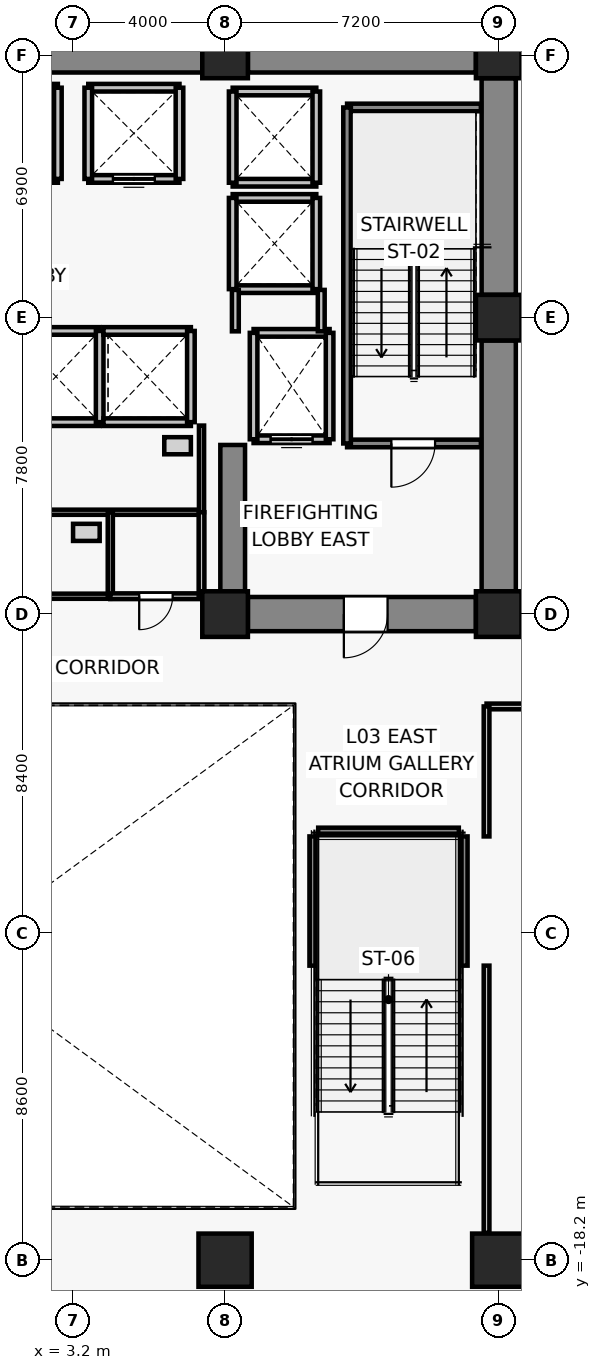
"""IFC4 building model, lengths in metres.
Left out: names, types, materials, properties, quantities, classifications, styles, units other than length and angle.
Written with IfcOpenShell. Run it as: python <this file> out.ifc"""

import sys

from ifc_helpers import new_model, si_unit, direction, frame, frame_2d, origin, origin_2d, place, context, subcontext, project, spatial, rectangle, extrude, source, transform, mapped, element, fill, save


model = new_model("IFC4")
c1 = context("Model", 3, precision=1e-05, world=origin(), true_north=direction((0.0, 1.0)))
c2 = subcontext(c1, "Body", "Model", "MODEL_VIEW")
j1 = project(units=[si_unit("LENGTHUNIT", "METRE"), si_unit("PLANEANGLEUNIT", "RADIAN")], contexts=[c1])
p1 = place(None, origin())
s1 = spatial("IfcSite", under=j1, at=p1, CompositionType="ELEMENT")
p2 = place(p1, origin())
s2 = spatial("IfcBuilding", under=s1, at=p2, CompositionType="ELEMENT")
p3 = place(p2, frame((0.0, 0.0, 13.8)))
s3 = spatial("IfcBuildingStorey", under=s2, at=p3, CompositionType="ELEMENT", Elevation=13.8)
for number, where, z_axis, x_axis in (
    (1, (7.2, -1.2, 0.0), (0.0, 0.0, 1.0), (1.0, 0.0, 0.0)),
    (2, (14.4, -1.2, 0.0), (0.0, 0.0, 1.0), (1.0, 0.0, 0.0)),
    (3, (14.4, 6.6, 0.0), (0.0, 0.0, 1.0), (1.0, 0.0, 0.0)),
    (4, (7.2, 13.5, 0.0), (0.0, 0.0, 1.0), (1.0, 0.0, 0.0)),
    (5, (14.4, 13.5, 0.0), (0.0, 0.0, 1.0), (1.0, 0.0, 0.0)),
):
    element("IfcColumn", number, at=place(p3, frame(where, z_axis=z_axis, x_axis=x_axis)), inside=s3, PredefinedType="COLUMN", context=c2, shape_type="SweptSolid", body=[
        extrude(rectangle(XDim=1.2, YDim=1.2, at=origin_2d()), origin(), (0.0, 0.0, 1.0), 4.4),
    ])
for number, where, z_axis, x_axis in (
    (6, (7.2, -18.2, 0.0), (0.0, 0.0, 1.0), (1.0, 0.0, 0.0)),
    (7, (14.4, -18.2, 0.0), (0.0, 0.0, 1.0), (1.0, 0.0, 0.0)),
):
    element("IfcColumn", number, at=place(p3, frame(where, z_axis=z_axis, x_axis=x_axis)), inside=s3, PredefinedType="COLUMN", context=c2, shape_type="SweptSolid", body=[
        extrude(rectangle(XDim=1.4, YDim=1.4, at=origin_2d()), origin(), (0.0, 0.0, 1.0), 4.4),
    ])
p4 = place(p3, frame((-6.6, 13.5, 0.0), z_axis=(0.0, 0.0, 1.0), x_axis=(1.0, 0.0, 0.0)))
e8 = element("IfcWall", 8, at=p4, inside=s3, PredefinedType="SHEAR", context=c2, shape_type="SweptSolid", body=[
    extrude(rectangle(XDim=13.2, YDim=0.9, at=frame_2d((6.6, 0.0))), origin(), (0.0, 0.0, 1.0), 4.1),
])
p5 = place(p3, frame((7.8, 13.5, 0.0), z_axis=(0.0, 0.0, 1.0), x_axis=(1.0, 0.0, 0.0)))
e9 = element("IfcWall", 9, at=p5, inside=s3, PredefinedType="SHEAR", context=c2, shape_type="SweptSolid", body=[
    extrude(rectangle(XDim=6.0, YDim=0.9, at=frame_2d((3.0, 0.0))), origin(), (0.0, 0.0, 1.0), 4.1),
])
p6 = place(p3, frame((14.4, -0.6, 0.0), z_axis=(0.0, 0.0, 1.0), x_axis=(0.0, 1.0, 0.0)))
e10 = element("IfcWall", 10, at=p6, inside=s3, PredefinedType="SHEAR", context=c2, shape_type="SweptSolid", body=[
    extrude(rectangle(XDim=6.6, YDim=0.9, at=frame_2d((3.3, 0.0))), origin(), (0.0, 0.0, 1.0), 4.1),
])
p7 = place(p3, frame((14.4, 7.2, 0.0), z_axis=(0.0, 0.0, 1.0), x_axis=(0.0, 1.0, 0.0)))
e11 = element("IfcWall", 11, at=p7, inside=s3, PredefinedType="SHEAR", context=c2, shape_type="SweptSolid", body=[
    extrude(rectangle(XDim=5.7, YDim=0.9, at=frame_2d((2.85, 0.0))), origin(), (0.0, 0.0, 1.0), 4.1),
])
p8 = place(p3, frame((13.8, -1.2, 0.0), z_axis=(0.0, 0.0, 1.0), x_axis=(-1.0, 0.0, 0.0)))
e12 = element("IfcWall", 12, at=p8, inside=s3, PredefinedType="SHEAR", context=c2, shape_type="SweptSolid", body=[
    extrude(rectangle(XDim=6.0, YDim=0.9, at=frame_2d((3.0, 0.0))), origin(), (0.0, 0.0, 1.0), 4.1),
])
p9 = place(p8, frame((2.325, 0.0, 0.0)))
e13 = element("IfcOpeningElement", 13, at=p9, cuts=e12, PredefinedType="OPENING", context=c2, shape_type="SweptSolid", body=[
    extrude(rectangle(XDim=1.15, YDim=2.15, at=frame_2d((0.575, 1.075))), frame((0.0, 0.46, 0.0), z_axis=(0.0, -1.0, 0.0), x_axis=(1.0, 0.0, 0.0)), (0.0, 0.0, 1.0), 0.92),
])
p10 = place(p3, frame((7.4, -0.75, 0.0), z_axis=(0.0, 0.0, 1.0), x_axis=(0.0, 1.0, 0.0)))
e14 = element("IfcWall", 14, at=p10, inside=s3, PredefinedType="SHEAR", context=c2, shape_type="SweptSolid", body=[
    extrude(rectangle(XDim=4.0, YDim=0.65, at=frame_2d((2.0, 0.0))), origin(), (0.0, 0.0, 1.0), 4.1),
])
for number, where, z_axis, x_axis in (
    (15, (9.52, -10.45, 0.0), (0.0, 0.0, 1.0), (0.0, 1.0, 0.0)),
    (16, (13.48, -7.05, 0.0), (0.0, 0.0, 1.0), (0.0, -1.0, 0.0)),
):
    element("IfcWall", number, at=place(p3, frame(where, z_axis=z_axis, x_axis=x_axis)), inside=s3, PredefinedType="SOLIDWALL", context=c2, shape_type="SweptSolid", body=[
        extrude(rectangle(XDim=3.4, YDim=0.2, at=frame_2d((1.7, 0.0))), origin(), (0.0, 0.0, 1.0), 4.1),
    ])
p11 = place(p3, frame((9.65, -6.92, 0.0), z_axis=(0.0, 0.0, 1.0), x_axis=(1.0, 0.0, 0.0)))
e17 = element("IfcWall", 17, at=p11, inside=s3, PredefinedType="SOLIDWALL", context=c2, shape_type="SweptSolid", body=[
    extrude(rectangle(XDim=3.7, YDim=0.2, at=frame_2d((1.85, 0.0))), origin(), (0.0, 0.0, 1.0), 4.1),
])
p12 = place(p3, frame((9.95, 3.4, 0.0), z_axis=(0.0, 0.0, 1.0), x_axis=(-1.0, 0.0, 0.0)))
e18 = element("IfcWall", 18, at=p12, inside=s3, PredefinedType="SOLIDWALL", context=c2, shape_type="SweptSolid", body=[
    extrude(rectangle(XDim=2.0, YDim=0.2, at=frame_2d((1.0, 0.0))), origin(), (0.0, 0.0, 1.0), 4.1),
])
p13 = place(p12, frame((0.45, 0.0, 0.0)))
e19 = element("IfcOpeningElement", 19, at=p13, cuts=e18, PredefinedType="OPENING", context=c2, shape_type="SweptSolid", body=[
    extrude(rectangle(XDim=1.1, YDim=2.2, at=frame_2d((0.55, 1.1))), frame((0.0, 0.11, 0.0), z_axis=(0.0, -1.0, 0.0), x_axis=(1.0, 0.0, 0.0)), (0.0, 0.0, 1.0), 0.22),
])
p14 = place(p3, frame((7.95, 6.2, 0.0), z_axis=(0.0, 0.0, 1.0), x_axis=(1.0, 0.0, 0.0)))
e20 = element("IfcWall", 20, at=p14, inside=s3, PredefinedType="SOLIDWALL", context=c2, shape_type="SweptSolid", body=[
    extrude(rectangle(XDim=2.0, YDim=0.2, at=frame_2d((1.0, 0.0))), origin(), (0.0, 0.0, 1.0), 4.1),
])
for number, where, z_axis, x_axis in (
    (21, (7.95, 3.4, 0.0), (0.0, 0.0, 1.0), (0.0, 1.0, 0.0)),
    (22, (9.95, 6.2, 0.0), (0.0, 0.0, 1.0), (0.0, -1.0, 0.0)),
):
    element("IfcWall", number, at=place(p3, frame(where, z_axis=z_axis, x_axis=x_axis)), inside=s3, PredefinedType="SOLIDWALL", context=c2, shape_type="SweptSolid", body=[
        extrude(rectangle(XDim=2.8, YDim=0.2, at=frame_2d((1.4, 0.0))), origin(), (0.0, 0.0, 1.0), 4.1),
    ])
p15 = place(p3, frame((2.8, 10.25, 0.0), z_axis=(0.0, 0.0, 1.0), x_axis=(-1.0, 0.0, 0.0)))
e23 = element("IfcWall", 23, at=p15, inside=s3, PredefinedType="SOLIDWALL", context=c2, shape_type="SweptSolid", body=[
    extrude(rectangle(XDim=2.4, YDim=0.2, at=frame_2d((1.2, 0.0))), origin(), (0.0, 0.0, 1.0), 4.1),
])
p16 = place(p15, frame((0.65, 0.0, 0.0)))
e24 = element("IfcOpeningElement", 24, at=p16, cuts=e23, PredefinedType="OPENING", context=c2, shape_type="SweptSolid", body=[
    extrude(rectangle(XDim=1.1, YDim=2.2, at=frame_2d((0.55, 1.1))), frame((0.0, 0.11, 0.0), z_axis=(0.0, -1.0, 0.0), x_axis=(1.0, 0.0, 0.0)), (0.0, 0.0, 1.0), 0.22),
])
p17 = place(p3, frame((0.4, 12.65, 0.0), z_axis=(0.0, 0.0, 1.0), x_axis=(1.0, 0.0, 0.0)))
e25 = element("IfcWall", 25, at=p17, inside=s3, PredefinedType="SOLIDWALL", context=c2, shape_type="SweptSolid", body=[
    extrude(rectangle(XDim=2.4, YDim=0.2, at=frame_2d((1.2, 0.0))), origin(), (0.0, 0.0, 1.0), 4.1),
])
p18 = place(p3, frame((2.8, 12.65, 0.0), z_axis=(0.0, 0.0, 1.0), x_axis=(0.0, -1.0, 0.0)))
e26 = element("IfcWall", 26, at=p18, inside=s3, PredefinedType="SOLIDWALL", context=c2, shape_type="SweptSolid", body=[
    extrude(rectangle(XDim=2.4, YDim=0.2, at=frame_2d((1.2, 0.0))), origin(), (0.0, 0.0, 1.0), 4.1),
])
p19 = place(p3, frame((6.0, 10.25, 0.0), z_axis=(0.0, 0.0, 1.0), x_axis=(-1.0, 0.0, 0.0)))
e27 = element("IfcWall", 27, at=p19, inside=s3, PredefinedType="SOLIDWALL", context=c2, shape_type="SweptSolid", body=[
    extrude(rectangle(XDim=2.4, YDim=0.2, at=frame_2d((1.2, 0.0))), origin(), (0.0, 0.0, 1.0), 4.1),
])
p20 = place(p19, frame((0.65, 0.0, 0.0)))
e28 = element("IfcOpeningElement", 28, at=p20, cuts=e27, PredefinedType="OPENING", context=c2, shape_type="SweptSolid", body=[
    extrude(rectangle(XDim=1.1, YDim=2.2, at=frame_2d((0.55, 1.1))), frame((0.0, 0.11, 0.0), z_axis=(0.0, -1.0, 0.0), x_axis=(1.0, 0.0, 0.0)), (0.0, 0.0, 1.0), 0.22),
])
for number, where, z_axis, x_axis in (
    (29, (3.6, 12.65, 0.0), (0.0, 0.0, 1.0), (1.0, 0.0, 0.0)),
    (30, (3.6, 10.25, 0.0), (0.0, 0.0, 1.0), (0.0, 1.0, 0.0)),
    (31, (6.0, 12.65, 0.0), (0.0, 0.0, 1.0), (0.0, -1.0, 0.0)),
):
    element("IfcWall", number, at=place(p3, frame(where, z_axis=z_axis, x_axis=x_axis)), inside=s3, PredefinedType="SOLIDWALL", context=c2, shape_type="SweptSolid", body=[
        extrude(rectangle(XDim=2.4, YDim=0.2, at=frame_2d((1.2, 0.0))), origin(), (0.0, 0.0, 1.0), 4.1),
    ])
for number, where, z_axis, x_axis in (
    (32, (3.9, 3.85, 0.0), (0.0, 0.0, 1.0), (-1.0, 0.0, 0.0)),
    (33, (1.6, 6.25, 0.0), (0.0, 0.0, 1.0), (1.0, 0.0, 0.0)),
):
    element("IfcWall", number, at=place(p3, frame(where, z_axis=z_axis, x_axis=x_axis)), inside=s3, PredefinedType="SOLIDWALL", context=c2, shape_type="SweptSolid", body=[
        extrude(rectangle(XDim=2.3, YDim=0.2, at=frame_2d((1.15, 0.0))), origin(), (0.0, 0.0, 1.0), 4.1),
    ])
p21 = place(p3, frame((3.9, 6.25, 0.0), z_axis=(0.0, 0.0, 1.0), x_axis=(0.0, -1.0, 0.0)))
e34 = element("IfcWall", 34, at=p21, inside=s3, PredefinedType="SOLIDWALL", context=c2, shape_type="SweptSolid", body=[
    extrude(rectangle(XDim=2.4, YDim=0.2, at=frame_2d((1.2, 0.0))), origin(), (0.0, 0.0, 1.0), 4.1),
])
for number, where, z_axis, x_axis in (
    (35, (6.3, 3.85, 0.0), (0.0, 0.0, 1.0), (-1.0, 0.0, 0.0)),
    (36, (4.0, 6.25, 0.0), (0.0, 0.0, 1.0), (1.0, 0.0, 0.0)),
):
    element("IfcWall", number, at=place(p3, frame(where, z_axis=z_axis, x_axis=x_axis)), inside=s3, PredefinedType="SOLIDWALL", context=c2, shape_type="SweptSolid", body=[
        extrude(rectangle(XDim=2.3, YDim=0.2, at=frame_2d((1.15, 0.0))), origin(), (0.0, 0.0, 1.0), 4.1),
    ])
p22 = place(p3, frame((6.3, 6.25, 0.0), z_axis=(0.0, 0.0, 1.0), x_axis=(0.0, -1.0, 0.0)))
e37 = element("IfcWall", 37, at=p22, inside=s3, PredefinedType="SOLIDWALL", context=c2, shape_type="SweptSolid", body=[
    extrude(rectangle(XDim=2.4, YDim=0.2, at=frame_2d((1.2, 0.0))), origin(), (0.0, 0.0, 1.0), 4.1),
])
for number, where, z_axis, x_axis in (
    (38, (9.6, 7.35, 0.0), (0.0, 0.0, 1.0), (-1.0, 0.0, 0.0)),
    (39, (7.4, 9.75, 0.0), (0.0, 0.0, 1.0), (1.0, 0.0, 0.0)),
):
    element("IfcWall", number, at=place(p3, frame(where, z_axis=z_axis, x_axis=x_axis)), inside=s3, PredefinedType="SOLIDWALL", context=c2, shape_type="SweptSolid", body=[
        extrude(rectangle(XDim=2.2, YDim=0.2, at=frame_2d((1.1, 0.0))), origin(), (0.0, 0.0, 1.0), 3.19),
    ])
p23 = place(p3, frame((7.4, 7.35, 0.0), z_axis=(0.0, 0.0, 1.0), x_axis=(0.0, 1.0, 0.0)))
e40 = element("IfcWall", 40, at=p23, inside=s3, PredefinedType="SOLIDWALL", context=c2, shape_type="SweptSolid", body=[
    extrude(rectangle(XDim=2.4, YDim=0.2, at=frame_2d((1.2, 0.0))), origin(), (0.0, 0.0, 1.0), 3.19),
])
p24 = place(p3, frame((9.6, 9.75, 0.0), z_axis=(0.0, 0.0, 1.0), x_axis=(0.0, -1.0, 0.0)))
e41 = element("IfcWall", 41, at=p24, inside=s3, PredefinedType="SOLIDWALL", context=c2, shape_type="SweptSolid", body=[
    extrude(rectangle(XDim=2.4, YDim=0.2, at=frame_2d((1.2, 0.0))), origin(), (0.0, 0.0, 1.0), 4.1),
])
for number, where, z_axis, x_axis in (
    (42, (9.6, 10.15, 0.0), (0.0, 0.0, 1.0), (-1.0, 0.0, 0.0)),
    (43, (7.4, 12.55, 0.0), (0.0, 0.0, 1.0), (1.0, 0.0, 0.0)),
):
    element("IfcWall", number, at=place(p3, frame(where, z_axis=z_axis, x_axis=x_axis)), inside=s3, PredefinedType="SOLIDWALL", context=c2, shape_type="SweptSolid", body=[
        extrude(rectangle(XDim=2.2, YDim=0.2, at=frame_2d((1.1, 0.0))), origin(), (0.0, 0.0, 1.0), 3.19),
    ])
p25 = place(p3, frame((7.4, 10.15, 0.0), z_axis=(0.0, 0.0, 1.0), x_axis=(0.0, 1.0, 0.0)))
e44 = element("IfcWall", 44, at=p25, inside=s3, PredefinedType="SOLIDWALL", context=c2, shape_type="SweptSolid", body=[
    extrude(rectangle(XDim=2.4, YDim=0.2, at=frame_2d((1.2, 0.0))), origin(), (0.0, 0.0, 1.0), 3.19),
])
p26 = place(p3, frame((9.6, 12.55, 0.0), z_axis=(0.0, 0.0, 1.0), x_axis=(0.0, -1.0, 0.0)))
e45 = element("IfcWall", 45, at=p26, inside=s3, PredefinedType="SOLIDWALL", context=c2, shape_type="SweptSolid", body=[
    extrude(rectangle(XDim=2.4, YDim=0.2, at=frame_2d((1.2, 0.0))), origin(), (0.0, 0.0, 1.0), 4.1),
])
p27 = place(p3, frame((13.93, 3.29, 0.0), z_axis=(0.0, 0.0, 1.0), x_axis=(-1.0, 0.0, 0.0)))
e46 = element("IfcWall", 46, at=p27, inside=s3, PredefinedType="SOLIDWALL", context=c2, shape_type="SweptSolid", body=[
    extrude(rectangle(XDim=3.52, YDim=0.2, at=frame_2d((1.76, 0.0))), origin(), (0.0, 0.0, 1.0), 4.1),
])
p28 = place(p27, frame((1.205, 0.0, 0.0)))
e47 = element("IfcOpeningElement", 47, at=p28, cuts=e46, PredefinedType="OPENING", context=c2, shape_type="SweptSolid", body=[
    extrude(rectangle(XDim=1.15, YDim=2.15, at=frame_2d((0.575, 1.075))), frame((0.0, 0.11, 0.0), z_axis=(0.0, -1.0, 0.0), x_axis=(1.0, 0.0, 0.0)), (0.0, 0.0, 1.0), 0.22),
])
p29 = place(p3, frame((10.41, 12.13, 0.0), z_axis=(0.0, 0.0, 1.0), x_axis=(1.0, 0.0, 0.0)))
e48 = element("IfcWall", 48, at=p29, inside=s3, PredefinedType="SOLIDWALL", context=c2, shape_type="SweptSolid", body=[
    extrude(rectangle(XDim=3.52, YDim=0.2, at=frame_2d((1.76, 0.0))), origin(), (0.0, 0.0, 1.0), 4.1),
])
p30 = place(p3, frame((10.41, 3.29, 0.0), z_axis=(0.0, 0.0, 1.0), x_axis=(0.0, 1.0, 0.0)))
e49 = element("IfcWall", 49, at=p30, inside=s3, PredefinedType="SOLIDWALL", context=c2, shape_type="SweptSolid", body=[
    extrude(rectangle(XDim=8.84, YDim=0.2, at=frame_2d((4.42, 0.0))), origin(), (0.0, 0.0, 1.0), 4.1),
])
p31 = place(p3, frame((7.47, 6.24, 0.0), z_axis=(0.0, 0.0, 1.0), x_axis=(0.0, 1.0, 0.0)))
e50 = element("IfcWall", 50, at=p31, inside=s3, PredefinedType="PARTITIONING", context=c2, shape_type="SweptSolid", body=[
    extrude(rectangle(XDim=1.09, YDim=0.18, at=frame_2d((0.545, 0.0))), origin(), (0.0, 0.0, 1.0), 3.19),
])
p32 = place(p3, frame((9.73, 7.33, 0.0), z_axis=(0.0, 0.0, 1.0), x_axis=(0.0, -1.0, 0.0)))
e51 = element("IfcWall", 51, at=p32, inside=s3, PredefinedType="PARTITIONING", context=c2, shape_type="SweptSolid", body=[
    extrude(rectangle(XDim=1.09, YDim=0.18, at=frame_2d((0.545, 0.0))), origin(), (0.0, 0.0, 1.0), 4.1),
])
p33 = place(p3, frame((6.58, 1.48, 0.0), z_axis=(0.0, 0.0, 1.0), x_axis=(-1.0, 0.0, 0.0)))
e52 = element("IfcWall", 52, at=p33, inside=s3, PredefinedType="PARTITIONING", context=c2, shape_type="SweptSolid", body=[
    extrude(rectangle(XDim=5.11, YDim=0.135, at=frame_2d((2.555, 0.0))), origin(), (0.0, 0.0, 1.0), 4.1),
])
p34 = place(p3, frame((6.58, 3.76, 0.0), z_axis=(0.0, 0.0, 1.0), x_axis=(0.0, -1.0, 0.0)))
e53 = element("IfcWall", 53, at=p34, inside=s3, PredefinedType="PARTITIONING", context=c2, shape_type="SweptSolid", body=[
    extrude(rectangle(XDim=2.28, YDim=0.135, at=frame_2d((1.14, 0.0))), origin(), (0.0, 0.0, 1.0), 3.473),
])
p35 = place(p3, frame((4.18, -0.73, 0.0), z_axis=(0.0, 0.0, 1.0), x_axis=(-1.0, 0.0, 0.0)))
e54 = element("IfcWall", 54, at=p35, inside=s3, PredefinedType="PARTITIONING", context=c2, shape_type="SweptSolid", body=[
    extrude(rectangle(XDim=2.71, YDim=0.135, at=frame_2d((1.355, 0.0))), origin(), (0.0, 0.0, 1.0), 4.1),
])
p36 = place(p3, frame((4.18, 1.48, 0.0), z_axis=(0.0, 0.0, 1.0), x_axis=(0.0, -1.0, 0.0)))
e55 = element("IfcWall", 55, at=p36, inside=s3, PredefinedType="PARTITIONING", context=c2, shape_type="SweptSolid", body=[
    extrude(rectangle(XDim=2.21, YDim=0.135, at=frame_2d((1.105, 0.0))), origin(), (0.0, 0.0, 1.0), 4.1),
])
p37 = place(p3, frame((6.58, -0.73, 0.0), z_axis=(0.0, 0.0, 1.0), x_axis=(-1.0, 0.0, 0.0)))
e56 = element("IfcWall", 56, at=p37, inside=s3, PredefinedType="PARTITIONING", context=c2, shape_type="SweptSolid", body=[
    extrude(rectangle(XDim=2.4, YDim=0.15, at=frame_2d((1.2, 0.0))), origin(), (0.0, 0.0, 1.0), 4.1),
])
p38 = place(p37, frame((0.76, 0.0, 0.0)))
e57 = element("IfcOpeningElement", 57, at=p38, cuts=e56, PredefinedType="OPENING", context=c2, shape_type="SweptSolid", body=[
    extrude(rectangle(XDim=0.88, YDim=2.1, at=frame_2d((0.44, 1.05))), frame((0.0, 0.085, 0.0), z_axis=(0.0, -1.0, 0.0), x_axis=(1.0, 0.0, 0.0)), (0.0, 0.0, 1.0), 0.17),
])
p39 = place(p3, frame((6.58, 1.48, 0.0), z_axis=(0.0, 0.0, 1.0), x_axis=(0.0, -1.0, 0.0)))
e58 = element("IfcWall", 58, at=p39, inside=s3, PredefinedType="PARTITIONING", context=c2, shape_type="SweptSolid", body=[
    extrude(rectangle(XDim=2.21, YDim=0.15, at=frame_2d((1.105, 0.0))), origin(), (0.0, 0.0, 1.0), 4.1),
])
p40 = place(p3, frame((14.08, -3.63, 0.0), z_axis=(0.0, 0.0, 1.0), x_axis=(1.0, 0.0, 0.0)))
e59 = element("IfcWall", 59, at=p40, inside=s3, PredefinedType="PARTITIONING", context=c2, shape_type="SweptSolid", body=[
    extrude(rectangle(XDim=7.0, YDim=0.15, at=frame_2d((3.5, 0.0))), origin(), (0.0, 0.0, 1.0), 3.239),
])
p41 = place(p40, frame((2.67, 0.0, 0.0)))
e60 = element("IfcOpeningElement", 60, at=p41, cuts=e59, PredefinedType="OPENING", context=c2, shape_type="SweptSolid", body=[
    extrude(rectangle(XDim=1.5, YDim=2.2, at=frame_2d((0.75, 1.1))), frame((0.0, 0.085, 0.0), z_axis=(0.0, -1.0, 0.0), x_axis=(1.0, 0.0, 0.0)), (0.0, 0.0, 1.0), 0.17),
])
p42 = place(p3, frame((14.08, -17.48, 0.0), z_axis=(0.0, 0.0, 1.0), x_axis=(0.0, 1.0, 0.0)))
e61 = element("IfcWall", 61, at=p42, inside=s3, PredefinedType="PARTITIONING", context=c2, shape_type="SweptSolid", body=[
    extrude(rectangle(XDim=7.03, YDim=0.15, at=frame_2d((3.515, 0.0))), origin(), (0.0, 0.0, 1.0), 3.29),
])
p43 = place(p3, frame((14.08, -7.05, 0.0), z_axis=(0.0, 0.0, 1.0), x_axis=(0.0, 1.0, 0.0)))
e62 = element("IfcWall", 62, at=p43, inside=s3, PredefinedType="PARTITIONING", context=c2, shape_type="SweptSolid", body=[
    extrude(rectangle(XDim=3.42, YDim=0.15, at=frame_2d((1.71, 0.0))), origin(), (0.0, 0.0, 1.0), 3.29),
])
m1 = source(origin(), c2, "Body", "SweptSolid", [
    extrude(rectangle(XDim=1.1, YDim=2.2, at=frame_2d((0.55, 1.1))), frame((0.0, 0.025, 0.0), z_axis=(0.0, -1.0, 0.0), x_axis=(1.0, 0.0, 0.0)), (0.0, 0.0, 1.0), 0.05),
])
p44 = place(p13, origin())
e63 = element("IfcDoor", 63, at=p44, inside=s3, OperationType="DOUBLE_DOOR_SLIDING", PredefinedType="DOOR", context=c2, shape_type="MappedRepresentation", body=[
    mapped(m1, transform((0.0, 0.0, 0.0), x_axis=(1.0, 0.0, 0.0), y_axis=(0.0, 1.0, 0.0), z_axis=(0.0, 0.0, 1.0), scale=1.0)),
])
fill(e19, e63)
p45 = place(p20, origin())
e64 = element("IfcDoor", 64, at=p45, inside=s3, OperationType="DOUBLE_DOOR_SLIDING", PredefinedType="DOOR", context=c2, shape_type="MappedRepresentation", body=[
    mapped(m1, transform((0.0, 0.0, 0.0), x_axis=(1.0, 0.0, 0.0), y_axis=(0.0, 1.0, 0.0), z_axis=(0.0, 0.0, 1.0), scale=1.0)),
])
fill(e28, e64)
m2 = source(origin(), c2, "Body", "SweptSolid", [
    extrude(rectangle(XDim=1.15, YDim=2.15, at=frame_2d((0.575, 1.075))), frame((0.0, 0.025, 0.0), z_axis=(0.0, -1.0, 0.0), x_axis=(1.0, 0.0, 0.0)), (0.0, 0.0, 1.0), 0.05),
])
p46 = place(p28, origin())
e65 = element("IfcDoor", 65, at=p46, inside=s3, OperationType="SINGLE_SWING_RIGHT", PredefinedType="DOOR", context=c2, shape_type="MappedRepresentation", body=[
    mapped(m2, transform((0.0, 0.0, 0.0), x_axis=(1.0, 0.0, 0.0), y_axis=(0.0, 1.0, 0.0), z_axis=(0.0, 0.0, 1.0), scale=1.0)),
])
fill(e47, e65)
p47 = place(p9, origin())
e66 = element("IfcDoor", 66, at=p47, inside=s3, OperationType="SINGLE_SWING_RIGHT", PredefinedType="DOOR", context=c2, shape_type="MappedRepresentation", body=[
    mapped(m2, transform((0.0, 0.0, 0.0), x_axis=(1.0, 0.0, 0.0), y_axis=(0.0, 1.0, 0.0), z_axis=(0.0, 0.0, 1.0), scale=1.0)),
])
fill(e13, e66)
m3 = source(origin(), c2, "Body", "SweptSolid", [
    extrude(rectangle(XDim=0.88, YDim=2.1, at=frame_2d((0.44, 1.05))), frame((0.0, 0.025, 0.0), z_axis=(0.0, -1.0, 0.0), x_axis=(1.0, 0.0, 0.0)), (0.0, 0.0, 1.0), 0.05),
])
p48 = place(p38, origin())
e67 = element("IfcDoor", 67, at=p48, inside=s3, OperationType="SINGLE_SWING_RIGHT", PredefinedType="DOOR", context=c2, shape_type="MappedRepresentation", body=[
    mapped(m3, transform((0.0, 0.0, 0.0), x_axis=(1.0, 0.0, 0.0), y_axis=(0.0, 1.0, 0.0), z_axis=(0.0, 0.0, 1.0), scale=1.0)),
])
fill(e57, e67)
save(model, sys.argv[1])
